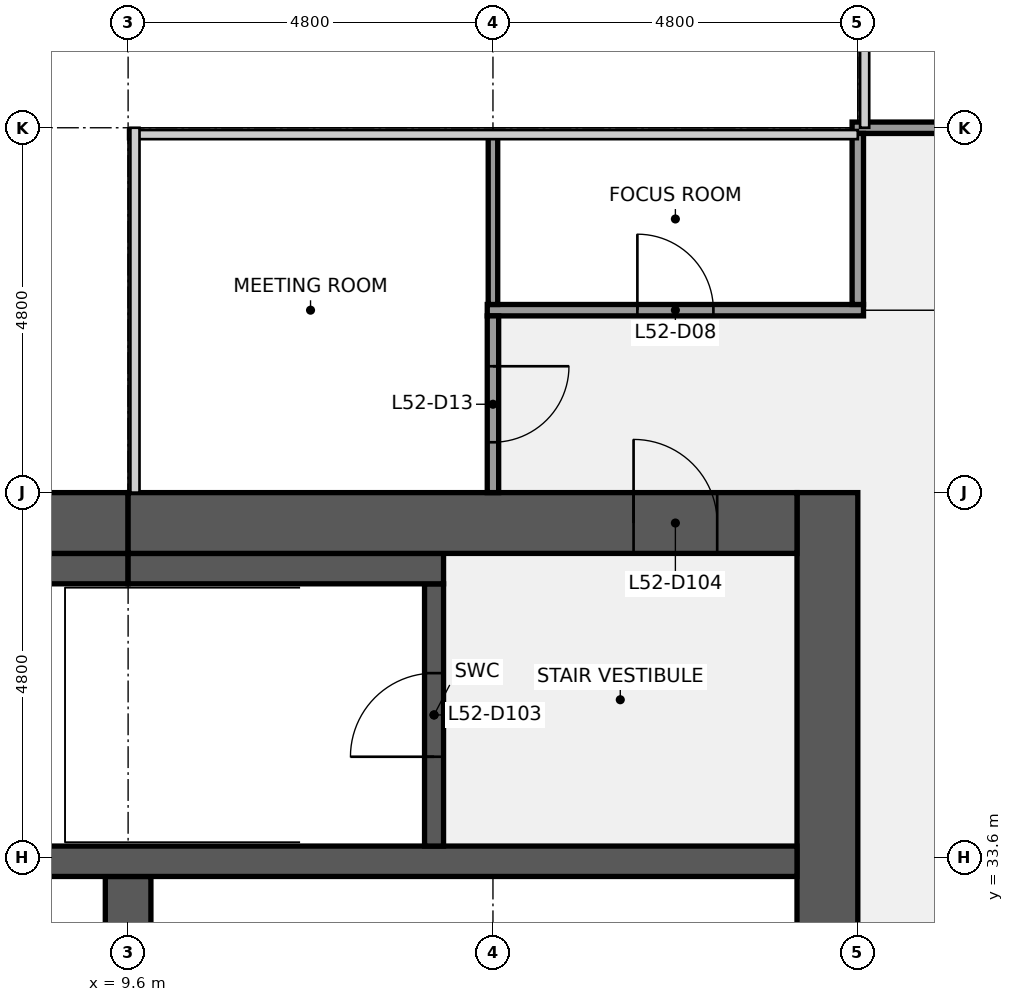
"""IFC4 building model, lengths in metres.
Left out: names, types, materials, properties, quantities, classifications, styles, units other than length and angle.
Written with IfcOpenShell. Run it as: python <this file> out.ifc"""

import sys

from ifc_helpers import new_model, si_unit, direction, frame, frame_2d, origin, place, context, subcontext, project, spatial, rectangle, extrude, element, fill, save


model = new_model("IFC4")
c1 = context("Model", 3, precision=1e-05, world=origin(), true_north=direction((0.0, 1.0)))
c2 = subcontext(c1, "Body", "Model", "MODEL_VIEW")
j1 = project(units=[si_unit("LENGTHUNIT", "METRE"), si_unit("PLANEANGLEUNIT", "RADIAN")], contexts=[c1])
p1 = place(None, origin())
s1 = spatial("IfcSite", under=j1, at=p1, CompositionType="ELEMENT")
p2 = place(p1, origin())
s2 = spatial("IfcBuilding", under=s1, at=p2, CompositionType="ELEMENT")
p3 = place(p2, frame((0.0, 0.0, 237.2)))
s3 = spatial("IfcBuildingStorey", under=s2, at=p3, CompositionType="ELEMENT", Elevation=237.2)
p4 = place(p3, frame((18.8, 38.4, 0.0), z_axis=(0.0, 0.0, 1.0), x_axis=(0.0, -1.0, 0.0)))
e1 = element("IfcWall", 1, at=p4, inside=s3, PredefinedType="SHEAR", context=c2, shape_type="SweptSolid", body=[
    extrude(rectangle(XDim=28.8, YDim=0.8, at=frame_2d((14.4, 0.0))), origin(), (0.0, 0.0, 1.0), 3.84),
])
p5 = place(p4, frame((18.3, 0.0, 0.0)))
e2 = element("IfcOpeningElement", 2, at=p5, cuts=e1, PredefinedType="OPENING", context=c2, shape_type="SweptSolid", body=[
    extrude(rectangle(XDim=1.8, YDim=2.1, at=frame_2d((0.9, 1.05))), frame((0.0, 0.41, 0.0), z_axis=(0.0, -1.0, 0.0), x_axis=(1.0, 0.0, 0.0)), (0.0, 0.0, 1.0), 0.82),
])
p6 = place(p4, frame((8.7, 0.0, 0.0)))
e3 = element("IfcOpeningElement", 3, at=p6, cuts=e1, PredefinedType="OPENING", context=c2, shape_type="SweptSolid", body=[
    extrude(rectangle(XDim=1.8, YDim=2.1, at=frame_2d((0.9, 1.05))), frame((0.0, 0.41, 0.0), z_axis=(0.0, -1.0, 0.0), x_axis=(1.0, 0.0, 0.0)), (0.0, 0.0, 1.0), 0.82),
])
p7 = place(p3, frame((9.6, 30.75, 0.0), z_axis=(0.0, 0.0, 1.0), x_axis=(0.0, 1.0, 0.0)))
e4 = element("IfcWall", 4, at=p7, inside=s3, PredefinedType="SHEAR", context=c2, shape_type="SweptSolid", body=[
    extrude(rectangle(XDim=2.6, YDim=0.6, at=frame_2d((1.3, 0.0))), origin(), (0.0, 0.0, 1.0), 3.84),
])
p8 = place(p3, frame((0.8, 33.55, 0.0), z_axis=(0.0, 0.0, 1.0), x_axis=(1.0, 0.0, 0.0)))
e5 = element("IfcWall", 5, at=p8, inside=s3, PredefinedType="SHEAR", context=c2, shape_type="SweptSolid", body=[
    extrude(rectangle(XDim=17.6, YDim=0.4, at=frame_2d((8.8, 0.0))), origin(), (0.0, 0.0, 1.0), 3.84),
])
p9 = place(p3, frame((13.625, 33.75, 0.0), z_axis=(0.0, 0.0, 1.0), x_axis=(0.0, 1.0, 0.0)))
e6 = element("IfcWall", 6, at=p9, inside=s3, PredefinedType="SHEAR", context=c2, shape_type="SweptSolid", body=[
    extrude(rectangle(XDim=3.45, YDim=0.25, at=frame_2d((1.725, 0.0))), origin(), (0.0, 0.0, 1.0), 3.84),
])
p10 = place(p9, frame((1.175, 0.0, 0.0)))
e7 = element("IfcOpeningElement", 7, at=p10, cuts=e6, PredefinedType="OPENING", context=c2, shape_type="SweptSolid", body=[
    extrude(rectangle(XDim=1.1, YDim=2.1, at=frame_2d((0.55, 1.05))), frame((0.0, 0.135, 0.0), z_axis=(0.0, -1.0, 0.0), x_axis=(1.0, 0.0, 0.0)), (0.0, 0.0, 1.0), 0.27),
])
p11 = place(p3, frame((6.25, 37.4, 0.0), z_axis=(0.0, 0.0, 1.0), x_axis=(1.0, 0.0, 0.0)))
e8 = element("IfcWall", 8, at=p11, inside=s3, PredefinedType="SHEAR", context=c2, shape_type="SweptSolid", body=[
    extrude(rectangle(XDim=3.35, YDim=0.4, at=frame_2d((1.675, 0.0))), origin(), (0.0, 0.0, 1.0), 3.84),
])
p12 = place(p3, frame((9.6, 37.4, 0.0), z_axis=(0.0, 0.0, 1.0), x_axis=(1.0, 0.0, 0.0)))
e9 = element("IfcWall", 9, at=p12, inside=s3, PredefinedType="SHEAR", context=c2, shape_type="SweptSolid", body=[
    extrude(rectangle(XDim=4.15, YDim=0.4, at=frame_2d((2.075, 0.0))), origin(), (0.0, 0.0, 1.0), 3.84),
])
p13 = place(p3, frame((0.8, 38.0, 0.0), z_axis=(0.0, 0.0, 1.0), x_axis=(1.0, 0.0, 0.0)))
e10 = element("IfcWall", 10, at=p13, inside=s3, PredefinedType="SHEAR", context=c2, shape_type="SweptSolid", body=[
    extrude(rectangle(XDim=8.8, YDim=0.8, at=frame_2d((4.4, 0.0))), origin(), (0.0, 0.0, 1.0), 3.84),
])
p14 = place(p13, frame((5.5, 0.0, 0.9)))
e11 = element("IfcOpeningElement", 11, at=p14, cuts=e10, PredefinedType="OPENING", context=c2, shape_type="SweptSolid", body=[
    extrude(rectangle(XDim=1.8, YDim=1.5, at=frame_2d((0.9, 0.75))), frame((0.0, 0.41, 0.0), z_axis=(0.0, -1.0, 0.0), x_axis=(1.0, 0.0, 0.0)), (0.0, 0.0, 1.0), 0.82),
])
p15 = place(p3, frame((9.6, 38.0, 0.0), z_axis=(0.0, 0.0, 1.0), x_axis=(1.0, 0.0, 0.0)))
e12 = element("IfcWall", 12, at=p15, inside=s3, PredefinedType="SHEAR", context=c2, shape_type="SweptSolid", body=[
    extrude(rectangle(XDim=8.8, YDim=0.8, at=frame_2d((4.4, 0.0))), origin(), (0.0, 0.0, 1.0), 3.84),
])
p16 = place(p15, frame((6.65, 0.0, 0.0)))
e13 = element("IfcOpeningElement", 13, at=p16, cuts=e12, PredefinedType="OPENING", context=c2, shape_type="SweptSolid", body=[
    extrude(rectangle(XDim=1.1, YDim=2.1, at=frame_2d((0.55, 1.05))), frame((0.0, 0.41, 0.0), z_axis=(0.0, -1.0, 0.0), x_axis=(1.0, 0.0, 0.0)), (0.0, 0.0, 1.0), 0.82),
])
p17 = place(p3, frame((14.325, 40.8, 0.0), z_axis=(0.0, 0.0, 1.0), x_axis=(1.0, 0.0, 0.0)))
e14 = element("IfcWall", 14, at=p17, inside=s3, PredefinedType="PARTITIONING", context=c2, shape_type="SweptSolid", body=[
    extrude(rectangle(XDim=4.95, YDim=0.15, at=frame_2d((2.475, 0.0))), origin(), (0.0, 0.0, 1.0), 2.87),
])
p18 = place(p17, frame((1.975, 0.0, 0.0)))
e15 = element("IfcOpeningElement", 15, at=p18, cuts=e14, PredefinedType="OPENING", context=c2, shape_type="SweptSolid", body=[
    extrude(rectangle(XDim=1.0, YDim=2.1, at=frame_2d((0.5, 1.05))), frame((0.0, 0.085, 0.0), z_axis=(0.0, -1.0, 0.0), x_axis=(1.0, 0.0, 0.0)), (0.0, 0.0, 1.0), 0.17),
])
p19 = place(p3, frame((19.125, 43.2, 0.0), z_axis=(0.0, 0.0, 1.0), x_axis=(1.0, 0.0, 0.0)))
e16 = element("IfcWall", 16, at=p19, inside=s3, PredefinedType="PARTITIONING", context=c2, shape_type="SweptSolid", body=[
    extrude(rectangle(XDim=19.35, YDim=0.15, at=frame_2d((9.675, 0.0))), origin(), (0.0, 0.0, 1.0), 2.87),
])
p20 = place(p19, frame((4.375, 0.0, 0.0)))
e17 = element("IfcOpeningElement", 17, at=p20, cuts=e16, PredefinedType="OPENING", context=c2, shape_type="SweptSolid", body=[
    extrude(rectangle(XDim=1.0, YDim=2.1, at=frame_2d((0.5, 1.05))), frame((0.0, 0.085, 0.0), z_axis=(0.0, -1.0, 0.0), x_axis=(1.0, 0.0, 0.0)), (0.0, 0.0, 1.0), 0.17),
])
p21 = place(p19, frame((13.975, 0.0, 0.0)))
e18 = element("IfcOpeningElement", 18, at=p21, cuts=e16, PredefinedType="OPENING", context=c2, shape_type="SweptSolid", body=[
    extrude(rectangle(XDim=1.0, YDim=2.1, at=frame_2d((0.5, 1.05))), frame((0.0, 0.085, 0.0), z_axis=(0.0, -1.0, 0.0), x_axis=(1.0, 0.0, 0.0)), (0.0, 0.0, 1.0), 0.17),
])
p22 = place(p3, frame((14.4, 40.875, 0.0), z_axis=(0.0, 0.0, 1.0), x_axis=(0.0, 1.0, 0.0)))
e19 = element("IfcWall", 19, at=p22, inside=s3, PredefinedType="PARTITIONING", context=c2, shape_type="SweptSolid", body=[
    extrude(rectangle(XDim=2.225, YDim=0.125, at=frame_2d((1.113, 0.0))), origin(), (0.0, 0.0, 1.0), 2.87),
])
p23 = place(p3, frame((14.4, 38.4, 0.0), z_axis=(0.0, 0.0, 1.0), x_axis=(0.0, 1.0, 0.0)))
e20 = element("IfcWall", 20, at=p23, inside=s3, PredefinedType="PARTITIONING", context=c2, shape_type="SweptSolid", body=[
    extrude(rectangle(XDim=2.325, YDim=0.15, at=frame_2d((1.163, 0.0))), origin(), (0.0, 0.0, 1.0), 2.87),
])
p24 = place(p23, frame((0.663, 0.0, 0.0)))
e21 = element("IfcOpeningElement", 21, at=p24, cuts=e20, PredefinedType="OPENING", context=c2, shape_type="SweptSolid", body=[
    extrude(rectangle(XDim=1.0, YDim=2.1, at=frame_2d((0.5, 1.05))), frame((0.0, 0.085, 0.0), z_axis=(0.0, -1.0, 0.0), x_axis=(1.0, 0.0, 0.0)), (0.0, 0.0, 1.0), 0.17),
])
p25 = place(p3, frame((19.2, 40.875, 0.0), z_axis=(0.0, 0.0, 1.0), x_axis=(0.0, 1.0, 0.0)))
e22 = element("IfcWall", 22, at=p25, inside=s3, PredefinedType="PARTITIONING", context=c2, shape_type="SweptSolid", body=[
    extrude(rectangle(XDim=2.25, YDim=0.15, at=frame_2d((1.125, 0.0))), origin(), (0.0, 0.0, 1.0), 2.87),
])
p26 = place(p10, origin())
e23 = element("IfcDoor", 23, at=p26, inside=s3, OperationType="SINGLE_SWING_LEFT", PredefinedType="DOOR", context=c2, shape_type="SweptSolid", body=[
    extrude(rectangle(XDim=1.1, YDim=2.1, at=frame_2d((0.55, 1.05))), frame((0.0, 0.025, 0.0), z_axis=(0.0, -1.0, 0.0), x_axis=(1.0, 0.0, 0.0)), (0.0, 0.0, 1.0), 0.05),
])
fill(e7, e23)
p27 = place(p16, origin())
e24 = element("IfcDoor", 24, at=p27, inside=s3, OperationType="SINGLE_SWING_LEFT", PredefinedType="DOOR", context=c2, shape_type="SweptSolid", body=[
    extrude(rectangle(XDim=1.1, YDim=2.1, at=frame_2d((0.55, 1.05))), frame((0.0, 0.025, 0.0), z_axis=(0.0, -1.0, 0.0), x_axis=(1.0, 0.0, 0.0)), (0.0, 0.0, 1.0), 0.05),
])
fill(e13, e24)
p28 = place(p18, origin())
e25 = element("IfcDoor", 25, at=p28, inside=s3, OperationType="SINGLE_SWING_LEFT", PredefinedType="DOOR", context=c2, shape_type="SweptSolid", body=[
    extrude(rectangle(XDim=1.0, YDim=2.1, at=frame_2d((0.5, 1.05))), frame((0.0, 0.025, 0.0), z_axis=(0.0, -1.0, 0.0), x_axis=(1.0, 0.0, 0.0)), (0.0, 0.0, 1.0), 0.05),
])
fill(e15, e25)
p29 = place(p24, origin())
e26 = element("IfcDoor", 26, at=p29, inside=s3, OperationType="SINGLE_SWING_RIGHT", PredefinedType="DOOR", context=c2, shape_type="SweptSolid", body=[
    extrude(rectangle(XDim=1.0, YDim=2.1, at=frame_2d((0.5, 1.05))), frame((0.0, 0.025, 0.0), z_axis=(0.0, -1.0, 0.0), x_axis=(1.0, 0.0, 0.0)), (0.0, 0.0, 1.0), 0.05),
])
fill(e21, e26)
save(model, sys.argv[1])
